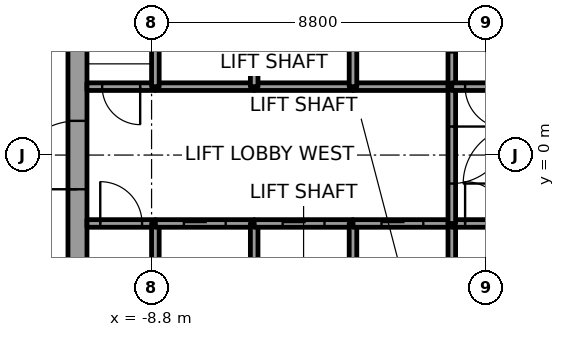
"""IFC4 building model, lengths in metres.
Left out: names, types, materials, properties, quantities, classifications, styles, units other than length and angle.
Written with IfcOpenShell. Run it as: python <this file> out.ifc"""

import sys

from ifc_helpers import new_model, si_unit, direction, frame, frame_2d, origin, place, context, subcontext, project, spatial, rectangle, extrude, element, fill, save


model = new_model("IFC4")
c1 = context("Model", 3, precision=1e-05, world=origin(), true_north=direction((0.0, 1.0)))
c2 = subcontext(c1, "Body", "Model", "MODEL_VIEW")
j1 = project(units=[si_unit("LENGTHUNIT", "METRE"), si_unit("PLANEANGLEUNIT", "RADIAN")], contexts=[c1])
p1 = place(None, origin())
s1 = spatial("IfcSite", under=j1, at=p1, CompositionType="ELEMENT")
p2 = place(p1, origin())
s2 = spatial("IfcBuilding", under=s1, at=p2, CompositionType="ELEMENT")
p3 = place(p2, frame((0.0, 0.0, 88.7)))
s3 = spatial("IfcBuildingStorey", under=s2, at=p3, CompositionType="ELEMENT", Elevation=88.7)
p4 = place(p3, frame((-10.75, -7.5, 0.0), z_axis=(0.0, 0.0, 1.0), x_axis=(0.0, 1.0, 0.0)))
e1 = element("IfcWall", 1, at=p4, inside=s3, PredefinedType="SHEAR", context=c2, shape_type="SweptSolid", body=[
    extrude(rectangle(XDim=15.0, YDim=0.5, at=frame_2d((7.5, 0.0))), origin(), (0.0, 0.0, 1.0), 3.7),
])
p5 = place(p4, frame((6.6, 0.0, 0.0)))
e2 = element("IfcOpeningElement", 2, at=p5, cuts=e1, PredefinedType="OPENING", context=c2, shape_type="SweptSolid", body=[
    extrude(rectangle(XDim=1.8, YDim=2.1, at=frame_2d((0.9, 1.05))), frame((0.0, 0.25, 0.0), z_axis=(0.0, -1.0, 0.0), x_axis=(1.0, 0.0, 0.0)), (0.0, 0.0, 1.0), 0.5),
])
p6 = place(p3, frame((-10.5, -1.8, 0.0), z_axis=(0.0, 0.0, 1.0), x_axis=(1.0, 0.0, 0.0)))
e3 = element("IfcWall", 3, at=p6, inside=s3, PredefinedType="SOLIDWALL", context=c2, shape_type="SweptSolid", body=[
    extrude(rectangle(XDim=1.8, YDim=0.2, at=frame_2d((0.9, 0.0))), origin(), (0.0, 0.0, 1.0), 3.55),
])
p7 = place(p6, frame((0.35, 0.0, 0.0)))
e4 = element("IfcOpeningElement", 4, at=p7, cuts=e3, PredefinedType="OPENING", context=c2, shape_type="SweptSolid", body=[
    extrude(rectangle(XDim=1.1, YDim=2.1, at=frame_2d((0.55, 1.05))), frame((0.0, 0.1, 0.0), z_axis=(0.0, -1.0, 0.0), x_axis=(1.0, 0.0, 0.0)), (0.0, 0.0, 1.0), 0.2),
])
p8 = place(p3, frame((-8.7, 1.8, 0.0), z_axis=(0.0, 0.0, 1.0), x_axis=(-1.0, 0.0, 0.0)))
e5 = element("IfcWall", 5, at=p8, inside=s3, PredefinedType="SOLIDWALL", context=c2, shape_type="SweptSolid", body=[
    extrude(rectangle(XDim=1.8, YDim=0.2, at=frame_2d((0.9, 0.0))), origin(), (0.0, 0.0, 1.0), 3.55),
])
p9 = place(p8, frame((0.4, 0.0, 0.0)))
e6 = element("IfcOpeningElement", 6, at=p9, cuts=e5, PredefinedType="OPENING", context=c2, shape_type="SweptSolid", body=[
    extrude(rectangle(XDim=1.0, YDim=2.1, at=frame_2d((0.5, 1.05))), frame((0.0, 0.1, 0.0), z_axis=(0.0, -1.0, 0.0), x_axis=(1.0, 0.0, 0.0)), (0.0, 0.0, 1.0), 0.2),
])
p10 = place(p3, frame((-8.7, -4.6, 0.0), z_axis=(0.0, 0.0, 1.0), x_axis=(0.0, 1.0, 0.0)))
e7 = element("IfcWall", 7, at=p10, inside=s3, PredefinedType="SOLIDWALL", context=c2, shape_type="SweptSolid", body=[
    extrude(rectangle(XDim=2.8, YDim=0.2, at=frame_2d((1.4, 0.0))), origin(), (0.0, 0.0, 1.0), 3.55),
])
p11 = place(p3, frame((-8.7, -1.8, 0.0), z_axis=(0.0, 0.0, 1.0), x_axis=(1.0, 0.0, 0.0)))
e8 = element("IfcWall", 8, at=p11, inside=s3, PredefinedType="SOLIDWALL", context=c2, shape_type="SweptSolid", body=[
    extrude(rectangle(XDim=2.6, YDim=0.2, at=frame_2d((1.3, 0.0))), origin(), (0.0, 0.0, 1.0), 3.55),
])
p12 = place(p11, frame((0.75, 0.0, 0.0)))
e9 = element("IfcOpeningElement", 9, at=p12, cuts=e8, PredefinedType="OPENING", context=c2, shape_type="SweptSolid", body=[
    extrude(rectangle(XDim=1.1, YDim=2.1, at=frame_2d((0.55, 1.05))), frame((0.0, 0.1, 0.0), z_axis=(0.0, -1.0, 0.0), x_axis=(1.0, 0.0, 0.0)), (0.0, 0.0, 1.0), 0.2),
])
p13 = place(p3, frame((-6.1, 1.8, 0.0), z_axis=(0.0, 0.0, 1.0), x_axis=(-1.0, 0.0, 0.0)))
e10 = element("IfcWall", 10, at=p13, inside=s3, PredefinedType="SOLIDWALL", context=c2, shape_type="SweptSolid", body=[
    extrude(rectangle(XDim=2.6, YDim=0.2, at=frame_2d((1.3, 0.0))), origin(), (0.0, 0.0, 1.0), 3.55),
])
for number, where, z_axis, x_axis in (
    (11, (-8.7, 1.8, 0.0), (0.0, 0.0, 1.0), (0.0, 1.0, 0.0)),
    (12, (-6.1, -4.6, 0.0), (0.0, 0.0, 1.0), (0.0, 1.0, 0.0)),
):
    element("IfcWall", number, at=place(p3, frame(where, z_axis=z_axis, x_axis=x_axis)), inside=s3, PredefinedType="SOLIDWALL", context=c2, shape_type="SweptSolid", body=[
        extrude(rectangle(XDim=2.8, YDim=0.2, at=frame_2d((1.4, 0.0))), origin(), (0.0, 0.0, 1.0), 3.55),
    ])
p14 = place(p3, frame((-6.1, -1.8, 0.0), z_axis=(0.0, 0.0, 1.0), x_axis=(1.0, 0.0, 0.0)))
e13 = element("IfcWall", 13, at=p14, inside=s3, PredefinedType="SOLIDWALL", context=c2, shape_type="SweptSolid", body=[
    extrude(rectangle(XDim=2.6, YDim=0.2, at=frame_2d((1.3, 0.0))), origin(), (0.0, 0.0, 1.0), 3.55),
])
p15 = place(p14, frame((0.75, 0.0, 0.0)))
e14 = element("IfcOpeningElement", 14, at=p15, cuts=e13, PredefinedType="OPENING", context=c2, shape_type="SweptSolid", body=[
    extrude(rectangle(XDim=1.1, YDim=2.1, at=frame_2d((0.55, 1.05))), frame((0.0, 0.1, 0.0), z_axis=(0.0, -1.0, 0.0), x_axis=(1.0, 0.0, 0.0)), (0.0, 0.0, 1.0), 0.2),
])
p16 = place(p3, frame((-3.5, 1.8, 0.0), z_axis=(0.0, 0.0, 1.0), x_axis=(-1.0, 0.0, 0.0)))
e15 = element("IfcWall", 15, at=p16, inside=s3, PredefinedType="SOLIDWALL", context=c2, shape_type="SweptSolid", body=[
    extrude(rectangle(XDim=2.6, YDim=0.2, at=frame_2d((1.3, 0.0))), origin(), (0.0, 0.0, 1.0), 3.55),
])
for number, where, z_axis, x_axis in (
    (16, (-6.1, 1.8, 0.0), (0.0, 0.0, 1.0), (0.0, 1.0, 0.0)),
    (17, (-3.5, -4.6, 0.0), (0.0, 0.0, 1.0), (0.0, 1.0, 0.0)),
):
    element("IfcWall", number, at=place(p3, frame(where, z_axis=z_axis, x_axis=x_axis)), inside=s3, PredefinedType="SOLIDWALL", context=c2, shape_type="SweptSolid", body=[
        extrude(rectangle(XDim=2.8, YDim=0.2, at=frame_2d((1.4, 0.0))), origin(), (0.0, 0.0, 1.0), 3.55),
    ])
p17 = place(p3, frame((-3.5, -1.8, 0.0), z_axis=(0.0, 0.0, 1.0), x_axis=(1.0, 0.0, 0.0)))
e18 = element("IfcWall", 18, at=p17, inside=s3, PredefinedType="SOLIDWALL", context=c2, shape_type="SweptSolid", body=[
    extrude(rectangle(XDim=2.6, YDim=0.2, at=frame_2d((1.3, 0.0))), origin(), (0.0, 0.0, 1.0), 3.55),
])
p18 = place(p17, frame((0.75, 0.0, 0.0)))
e19 = element("IfcOpeningElement", 19, at=p18, cuts=e18, PredefinedType="OPENING", context=c2, shape_type="SweptSolid", body=[
    extrude(rectangle(XDim=1.1, YDim=2.1, at=frame_2d((0.55, 1.05))), frame((0.0, 0.1, 0.0), z_axis=(0.0, -1.0, 0.0), x_axis=(1.0, 0.0, 0.0)), (0.0, 0.0, 1.0), 0.2),
])
p19 = place(p3, frame((-0.9, 1.8, 0.0), z_axis=(0.0, 0.0, 1.0), x_axis=(-1.0, 0.0, 0.0)))
e20 = element("IfcWall", 20, at=p19, inside=s3, PredefinedType="SOLIDWALL", context=c2, shape_type="SweptSolid", body=[
    extrude(rectangle(XDim=2.6, YDim=0.2, at=frame_2d((1.3, 0.0))), origin(), (0.0, 0.0, 1.0), 3.55),
])
p20 = place(p3, frame((-3.5, 4.6, 0.0), z_axis=(0.0, 0.0, 1.0), x_axis=(0.0, -1.0, 0.0)))
e21 = element("IfcWall", 21, at=p20, inside=s3, PredefinedType="SOLIDWALL", context=c2, shape_type="SweptSolid", body=[
    extrude(rectangle(XDim=2.8, YDim=0.2, at=frame_2d((1.4, 0.0))), origin(), (0.0, 0.0, 1.0), 3.55),
])
p21 = place(p3, frame((-0.9, 1.8, 0.0), z_axis=(0.0, 0.0, 1.0), x_axis=(0.0, 1.0, 0.0)))
e22 = element("IfcWall", 22, at=p21, inside=s3, PredefinedType="SOLIDWALL", context=c2, shape_type="SweptSolid", body=[
    extrude(rectangle(XDim=3.0, YDim=0.2, at=frame_2d((1.5, 0.0))), origin(), (0.0, 0.0, 1.0), 3.55),
])
p22 = place(p21, frame((0.9, 0.0, 0.0)))
e23 = element("IfcOpeningElement", 23, at=p22, cuts=e22, PredefinedType="OPENING", context=c2, shape_type="SweptSolid", body=[
    extrude(rectangle(XDim=1.2, YDim=2.1, at=frame_2d((0.6, 1.05))), frame((0.0, 0.1, 0.0), z_axis=(0.0, -1.0, 0.0), x_axis=(1.0, 0.0, 0.0)), (0.0, 0.0, 1.0), 0.2),
])
p23 = place(p3, frame((-0.9, -4.6, 0.0), z_axis=(0.0, 0.0, 1.0), x_axis=(0.0, 1.0, 0.0)))
e24 = element("IfcWall", 24, at=p23, inside=s3, PredefinedType="SOLIDWALL", context=c2, shape_type="SweptSolid", body=[
    extrude(rectangle(XDim=2.8, YDim=0.2, at=frame_2d((1.4, 0.0))), origin(), (0.0, 0.0, 1.0), 3.55),
])
p24 = place(p3, frame((-0.9, -1.8, 0.0), z_axis=(0.0, 0.0, 1.0), x_axis=(1.0, 0.0, 0.0)))
e25 = element("IfcWall", 25, at=p24, inside=s3, PredefinedType="SOLIDWALL", context=c2, shape_type="SweptSolid", body=[
    extrude(rectangle(XDim=1.8, YDim=0.2, at=frame_2d((0.9, 0.0))), origin(), (0.0, 0.0, 1.0), 3.55),
])
p25 = place(p24, frame((0.35, 0.0, 0.0)))
e26 = element("IfcOpeningElement", 26, at=p25, cuts=e25, PredefinedType="OPENING", context=c2, shape_type="SweptSolid", body=[
    extrude(rectangle(XDim=1.1, YDim=2.1, at=frame_2d((0.55, 1.05))), frame((0.0, 0.1, 0.0), z_axis=(0.0, -1.0, 0.0), x_axis=(1.0, 0.0, 0.0)), (0.0, 0.0, 1.0), 0.2),
])
p26 = place(p3, frame((-0.9, 1.8, 0.0), z_axis=(0.0, 0.0, 1.0), x_axis=(0.0, -1.0, 0.0)))
e27 = element("IfcWall", 27, at=p26, inside=s3, PredefinedType="SOLIDWALL", context=c2, shape_type="SweptSolid", body=[
    extrude(rectangle(XDim=3.6, YDim=0.2, at=frame_2d((1.8, 0.0))), origin(), (0.0, 0.0, 1.0), 3.55),
])
p27 = place(p26, frame((1.05, 0.0, 0.0)))
e28 = element("IfcOpeningElement", 28, at=p27, cuts=e27, PredefinedType="OPENING", context=c2, shape_type="SweptSolid", body=[
    extrude(rectangle(XDim=1.5, YDim=2.1, at=frame_2d((0.75, 1.05))), frame((0.0, 0.1, 0.0), z_axis=(0.0, -1.0, 0.0), x_axis=(1.0, 0.0, 0.0)), (0.0, 0.0, 1.0), 0.2),
])
p28 = place(p3, frame((0.9, 1.8, 0.0), z_axis=(0.0, 0.0, 1.0), x_axis=(-1.0, 0.0, 0.0)))
e29 = element("IfcWall", 29, at=p28, inside=s3, PredefinedType="SOLIDWALL", context=c2, shape_type="SweptSolid", body=[
    extrude(rectangle(XDim=1.8, YDim=0.2, at=frame_2d((0.9, 0.0))), origin(), (0.0, 0.0, 1.0), 3.55),
])
p29 = place(p28, frame((0.35, 0.0, 0.0)))
e30 = element("IfcOpeningElement", 30, at=p29, cuts=e29, PredefinedType="OPENING", context=c2, shape_type="SweptSolid", body=[
    extrude(rectangle(XDim=1.1, YDim=2.1, at=frame_2d((0.55, 1.05))), frame((0.0, 0.1, 0.0), z_axis=(0.0, -1.0, 0.0), x_axis=(1.0, 0.0, 0.0)), (0.0, 0.0, 1.0), 0.2),
])
p30 = place(p12, origin())
e31 = element("IfcDoor", 31, at=p30, inside=s3, OperationType="SLIDING_TO_LEFT", PredefinedType="DOOR", context=c2, shape_type="SweptSolid", body=[
    extrude(rectangle(XDim=1.1, YDim=2.1, at=frame_2d((0.55, 1.05))), frame((0.0, 0.025, 0.0), z_axis=(0.0, -1.0, 0.0), x_axis=(1.0, 0.0, 0.0)), (0.0, 0.0, 1.0), 0.05),
])
fill(e9, e31)
p31 = place(p15, origin())
e32 = element("IfcDoor", 32, at=p31, inside=s3, OperationType="SLIDING_TO_RIGHT", PredefinedType="DOOR", context=c2, shape_type="SweptSolid", body=[
    extrude(rectangle(XDim=1.1, YDim=2.1, at=frame_2d((0.55, 1.05))), frame((0.0, 0.025, 0.0), z_axis=(0.0, -1.0, 0.0), x_axis=(1.0, 0.0, 0.0)), (0.0, 0.0, 1.0), 0.05),
])
fill(e14, e32)
p32 = place(p18, origin())
e33 = element("IfcDoor", 33, at=p32, inside=s3, OperationType="SLIDING_TO_RIGHT", PredefinedType="DOOR", context=c2, shape_type="SweptSolid", body=[
    extrude(rectangle(XDim=1.1, YDim=2.1, at=frame_2d((0.55, 1.05))), frame((0.0, 0.025, 0.0), z_axis=(0.0, -1.0, 0.0), x_axis=(1.0, 0.0, 0.0)), (0.0, 0.0, 1.0), 0.05),
])
fill(e19, e33)
p33 = place(p27, origin())
e34 = element("IfcDoor", 34, at=p33, inside=s3, OperationType="DOUBLE_DOOR_SINGLE_SWING", PredefinedType="DOOR", context=c2, shape_type="SweptSolid", body=[
    extrude(rectangle(XDim=1.5, YDim=2.1, at=frame_2d((0.75, 1.05))), frame((0.0, 0.025, 0.0), z_axis=(0.0, -1.0, 0.0), x_axis=(1.0, 0.0, 0.0)), (0.0, 0.0, 1.0), 0.05),
])
fill(e28, e34)
p34 = place(p7, origin())
e35 = element("IfcDoor", 35, at=p34, inside=s3, OperationType="SINGLE_SWING_RIGHT", PredefinedType="DOOR", context=c2, shape_type="SweptSolid", body=[
    extrude(rectangle(XDim=1.1, YDim=2.1, at=frame_2d((0.55, 1.05))), frame((0.0, 0.025, 0.0), z_axis=(0.0, -1.0, 0.0), x_axis=(1.0, 0.0, 0.0)), (0.0, 0.0, 1.0), 0.05),
])
fill(e4, e35)
p35 = place(p29, origin())
e36 = element("IfcDoor", 36, at=p35, inside=s3, OperationType="SINGLE_SWING_LEFT", PredefinedType="DOOR", context=c2, shape_type="SweptSolid", body=[
    extrude(rectangle(XDim=1.1, YDim=2.1, at=frame_2d((0.55, 1.05))), frame((0.0, 0.025, 0.0), z_axis=(0.0, -1.0, 0.0), x_axis=(1.0, 0.0, 0.0)), (0.0, 0.0, 1.0), 0.05),
])
fill(e30, e36)
p36 = place(p25, origin())
e37 = element("IfcDoor", 37, at=p36, inside=s3, OperationType="SINGLE_SWING_RIGHT", PredefinedType="DOOR", context=c2, shape_type="SweptSolid", body=[
    extrude(rectangle(XDim=1.1, YDim=2.1, at=frame_2d((0.55, 1.05))), frame((0.0, 0.025, 0.0), z_axis=(0.0, -1.0, 0.0), x_axis=(1.0, 0.0, 0.0)), (0.0, 0.0, 1.0), 0.05),
])
fill(e26, e37)
p37 = place(p9, origin())
e38 = element("IfcDoor", 38, at=p37, inside=s3, OperationType="SINGLE_SWING_RIGHT", PredefinedType="DOOR", context=c2, shape_type="SweptSolid", body=[
    extrude(rectangle(XDim=1.0, YDim=2.1, at=frame_2d((0.5, 1.05))), frame((0.0, 0.025, 0.0), z_axis=(0.0, -1.0, 0.0), x_axis=(1.0, 0.0, 0.0)), (0.0, 0.0, 1.0), 0.05),
])
fill(e6, e38)
p38 = place(p5, origin())
e39 = element("IfcDoor", 39, at=p38, inside=s3, OperationType="DOUBLE_DOOR_SINGLE_SWING", PredefinedType="DOOR", context=c2, shape_type="SweptSolid", body=[
    extrude(rectangle(XDim=1.8, YDim=2.1, at=frame_2d((0.9, 1.05))), frame((0.0, 0.025, 0.0), z_axis=(0.0, -1.0, 0.0), x_axis=(1.0, 0.0, 0.0)), (0.0, 0.0, 1.0), 0.05),
])
fill(e2, e39)
save(model, sys.argv[1])
